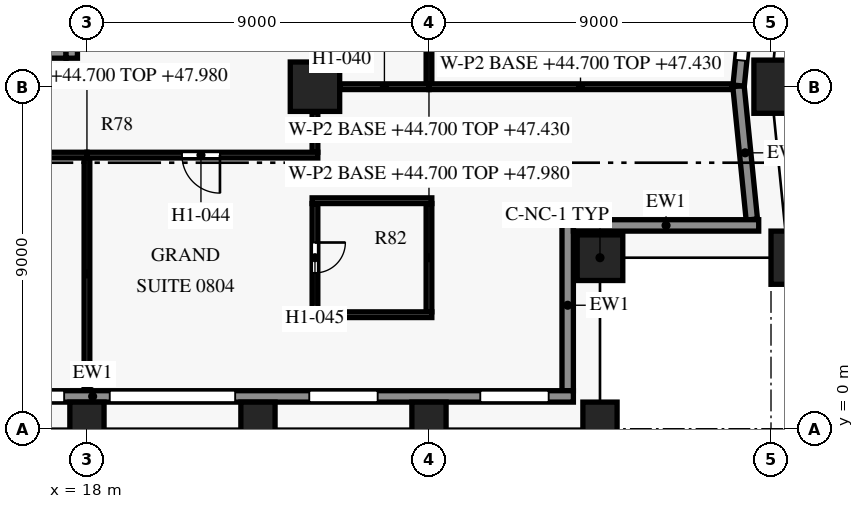
"""IFC4 building model, lengths in metres.
Left out: names, types, materials, properties, quantities, classifications, styles, units other than length and angle.
Written with IfcOpenShell. Run it as: python <this file> out.ifc"""

import sys

from ifc_helpers import new_model, si_unit, direction, frame, frame_2d, origin, origin_2d, place, context, subcontext, project, spatial, rectangle, extrude, element, fill, save


model = new_model("IFC4")
c1 = context("Model", 3, precision=1e-05, world=origin(), true_north=direction((0.0, 1.0)))
c2 = subcontext(c1, "Body", "Model", "MODEL_VIEW")
j1 = project(units=[si_unit("LENGTHUNIT", "METRE"), si_unit("PLANEANGLEUNIT", "RADIAN")], contexts=[c1])
p1 = place(None, origin())
s1 = spatial("IfcSite", under=j1, at=p1, CompositionType="ELEMENT")
p2 = place(p1, origin())
s2 = spatial("IfcBuilding", under=s1, at=p2, CompositionType="ELEMENT")
p3 = place(p2, frame((0.0, 0.0, 44.7)))
s3 = spatial("IfcBuildingStorey", under=s2, at=p3, CompositionType="ELEMENT", Elevation=44.7)
for number, where, z_axis, x_axis in (
    (1, (18.0, 0.0, 0.0), (0.0, 0.0, 1.0), (1.0, 0.0, 0.0)),
    (2, (22.5, 0.0, 0.0), (0.0, 0.0, 1.0), (1.0, 0.0, 0.0)),
    (3, (27.0, 0.0, 0.0), (0.0, 0.0, 1.0), (1.0, 0.0, 0.0)),
    (4, (31.5, 0.0, 0.0), (0.0, 0.0, 1.0), (1.0, 0.0, 0.0)),
    (5, (36.45, 4.5, 0.0), (0.0, 0.0, 1.0), (-0.1, 0.995, 0.0)),
    (6, (36.0, 9.0, 0.0), (0.0, 0.0, 1.0), (0.0, 1.0, 0.0)),
):
    element("IfcColumn", number, at=place(p3, frame(where, z_axis=z_axis, x_axis=x_axis)), inside=s3, PredefinedType="COLUMN", context=c2, shape_type="SweptSolid", body=[
        extrude(rectangle(XDim=0.9, YDim=1.4, at=origin_2d()), origin(), (0.0, 0.0, 1.0), 3.6),
    ])
p4 = place(p3, frame((31.5, 4.5, 0.0), z_axis=(0.0, 0.0, 1.0), x_axis=(1.0, 0.0, 0.0)))
e7 = element("IfcColumn", 7, at=p4, inside=s3, PredefinedType="COLUMN", context=c2, shape_type="SweptSolid", body=[
    extrude(rectangle(XDim=1.2, YDim=1.2, at=origin_2d()), origin(), (0.0, 0.0, 1.0), 3.6),
])
p5 = place(p3, frame((24.0, 9.0, 0.0), z_axis=(0.0, 0.0, 1.0), x_axis=(1.0, 0.0, 0.0)))
e8 = element("IfcColumn", 8, at=p5, inside=s3, PredefinedType="COLUMN", context=c2, shape_type="SweptSolid", body=[
    extrude(rectangle(XDim=1.3, YDim=1.3, at=origin_2d()), origin(), (0.0, 0.0, 1.0), 3.6),
])
p6 = place(p3, frame((30.8, 0.85, 0.0), z_axis=(0.0, 0.0, 1.0), x_axis=(-1.0, 0.0, 0.0)))
e9 = element("IfcWall", 9, at=p6, inside=s3, PredefinedType="SOLIDWALL", context=c2, shape_type="SweptSolid", body=[
    extrude(rectangle(XDim=25.3, YDim=0.3, at=frame_2d((12.65, 0.0))), origin(), (0.0, 0.0, 1.0), 2.95),
])
p7 = place(p6, frame((0.65, 0.0, 0.75)))
e10 = element("IfcOpeningElement", 10, at=p7, cuts=e9, PredefinedType="OPENING", context=c2, shape_type="SweptSolid", body=[
    extrude(rectangle(XDim=1.8, YDim=1.8, at=frame_2d((0.9, 0.9))), frame((0.0, 0.16, 0.0), z_axis=(0.0, -1.0, 0.0), x_axis=(1.0, 0.0, 0.0)), (0.0, 0.0, 1.0), 0.32),
])
p8 = place(p6, frame((5.15, 0.0, 0.75)))
e11 = element("IfcOpeningElement", 11, at=p8, cuts=e9, PredefinedType="OPENING", context=c2, shape_type="SweptSolid", body=[
    extrude(rectangle(XDim=1.8, YDim=1.8, at=frame_2d((0.9, 0.9))), frame((0.0, 0.16, 0.0), z_axis=(0.0, -1.0, 0.0), x_axis=(1.0, 0.0, 0.0)), (0.0, 0.0, 1.0), 0.32),
])
p9 = place(p6, frame((8.9, 0.0, 0.15)))
e12 = element("IfcOpeningElement", 12, at=p9, cuts=e9, PredefinedType="OPENING", context=c2, shape_type="SweptSolid", body=[
    extrude(rectangle(XDim=3.3, YDim=2.4, at=frame_2d((1.65, 1.2))), frame((0.0, 0.16, 0.0), z_axis=(0.0, -1.0, 0.0), x_axis=(1.0, 0.0, 0.0)), (0.0, 0.0, 1.0), 0.32),
])
p10 = place(p6, frame((13.4, 0.0, 0.15)))
e13 = element("IfcOpeningElement", 13, at=p10, cuts=e9, PredefinedType="OPENING", context=c2, shape_type="SweptSolid", body=[
    extrude(rectangle(XDim=3.3, YDim=2.4, at=frame_2d((1.65, 1.2))), frame((0.0, 0.16, 0.0), z_axis=(0.0, -1.0, 0.0), x_axis=(1.0, 0.0, 0.0)), (0.0, 0.0, 1.0), 0.32),
])
p11 = place(p6, frame((18.65, 0.0, 0.75)))
e14 = element("IfcOpeningElement", 14, at=p11, cuts=e9, PredefinedType="OPENING", context=c2, shape_type="SweptSolid", body=[
    extrude(rectangle(XDim=1.8, YDim=1.8, at=frame_2d((0.9, 0.9))), frame((0.0, 0.16, 0.0), z_axis=(0.0, -1.0, 0.0), x_axis=(1.0, 0.0, 0.0)), (0.0, 0.0, 1.0), 0.32),
])
p12 = place(p6, frame((23.15, 0.0, 0.75)))
e15 = element("IfcOpeningElement", 15, at=p12, cuts=e9, PredefinedType="OPENING", context=c2, shape_type="SweptSolid", body=[
    extrude(rectangle(XDim=1.8, YDim=1.8, at=frame_2d((0.9, 0.9))), frame((0.0, 0.16, 0.0), z_axis=(0.0, -1.0, 0.0), x_axis=(1.0, 0.0, 0.0)), (0.0, 0.0, 1.0), 0.32),
])
p13 = place(p3, frame((30.65, 5.5, 0.0), z_axis=(0.0, 0.0, 1.0), x_axis=(0.0, -1.0, 0.0)))
e16 = element("IfcWall", 16, at=p13, inside=s3, PredefinedType="SOLIDWALL", context=c2, shape_type="SweptSolid", body=[
    extrude(rectangle(XDim=4.502, YDim=0.3, at=frame_2d((2.251, 0.0))), origin(), (0.0, 0.0, 1.0), 2.95),
])
p14 = place(p3, frame((35.677, 5.35, 0.0), z_axis=(0.0, 0.0, 1.0), x_axis=(-1.0, 0.0, 0.0)))
e17 = element("IfcWall", 17, at=p14, inside=s3, PredefinedType="SOLIDWALL", context=c2, shape_type="SweptSolid", body=[
    extrude(rectangle(XDim=4.876, YDim=0.3, at=frame_2d((2.438, 0.0))), origin(), (0.0, 0.0, 1.0), 2.95),
])
p15 = place(p3, frame((35.144, 9.015, 0.0), z_axis=(0.0, 0.0, 1.0), x_axis=(0.099462600847, -0.995041301169, 0.0)))
e18 = element("IfcWall", 18, at=p15, inside=s3, PredefinedType="SOLIDWALL", context=c2, shape_type="SweptSolid", body=[
    extrude(rectangle(XDim=3.527, YDim=0.3, at=frame_2d((1.764, 0.0))), origin(), (0.0, 0.0, 1.0), 2.95),
])
p16 = place(p3, frame((36.047, 18.015, 0.0), z_axis=(0.0, 0.0, 1.0), x_axis=(-0.099522457379, -0.995035316196, 0.0)))
e19 = element("IfcWall", 19, at=p16, inside=s3, PredefinedType="SOLIDWALL", context=c2, shape_type="SweptSolid", body=[
    extrude(rectangle(XDim=9.03, YDim=0.3, at=frame_2d((4.515, 0.0))), origin(), (0.0, 0.0, 1.0), 2.95),
])
p17 = place(p16, frame((1.291, 0.0, 0.75)))
e20 = element("IfcOpeningElement", 20, at=p17, cuts=e19, PredefinedType="OPENING", context=c2, shape_type="SweptSolid", body=[
    extrude(rectangle(XDim=1.8, YDim=1.8, at=frame_2d((0.9, 0.9))), frame((0.0, 0.16, 0.0), z_axis=(0.0, -1.0, 0.0), x_axis=(1.0, 0.0, 0.0)), (0.0, 0.0, 1.0), 0.32),
])
p18 = place(p16, frame((5.064, 0.0, 0.15)))
e21 = element("IfcOpeningElement", 21, at=p18, cuts=e19, PredefinedType="OPENING", context=c2, shape_type="SweptSolid", body=[
    extrude(rectangle(XDim=3.3, YDim=2.4, at=frame_2d((1.65, 1.2))), frame((0.0, 0.16, 0.0), z_axis=(0.0, -1.0, 0.0), x_axis=(1.0, 0.0, 0.0)), (0.0, 0.0, 1.0), 0.32),
])
p19 = place(p3, frame((14.15, 9.9, 0.0), z_axis=(0.0, 0.0, 1.0), x_axis=(1.0, 0.0, 0.0)))
e22 = element("IfcWall", 22, at=p19, inside=s3, PredefinedType="SHEAR", context=c2, shape_type="SweptSolid", body=[
    extrude(rectangle(XDim=3.3, YDim=0.3, at=frame_2d((1.65, 0.0))), origin(), (0.0, 0.0, 1.0), 3.3),
])
p20 = place(p3, frame((17.6, 9.75, 0.0), z_axis=(0.0, 0.0, 1.0), x_axis=(0.0, 1.0, 0.0)))
e23 = element("IfcWall", 23, at=p20, inside=s3, PredefinedType="SHEAR", context=c2, shape_type="SweptSolid", body=[
    extrude(rectangle(XDim=8.3, YDim=0.3, at=frame_2d((4.15, 0.0))), origin(), (0.0, 0.0, 1.0), 3.3),
])
p21 = place(p20, frame((0.65, 0.0, 0.0)))
e24 = element("IfcOpeningElement", 24, at=p21, cuts=e23, PredefinedType="OPENING", context=c2, shape_type="SweptSolid", body=[
    extrude(rectangle(XDim=1.2, YDim=2.2, at=frame_2d((0.6, 1.1))), frame((0.0, 0.16, 0.0), z_axis=(0.0, -1.0, 0.0), x_axis=(1.0, 0.0, 0.0)), (0.0, 0.0, 1.0), 0.32),
])
p22 = place(p3, frame((23.925, 3.0, 0.0), z_axis=(0.0, 0.0, 1.0), x_axis=(1.0, 0.0, 0.0)))
e25 = element("IfcWall", 25, at=p22, inside=s3, PredefinedType="PARTITIONING", context=c2, shape_type="SweptSolid", body=[
    extrude(rectangle(XDim=3.15, YDim=0.15, at=frame_2d((1.575, 0.0))), origin(), (0.0, 0.0, 1.0), 2.58),
])
p23 = place(p3, frame((27.0, 3.075, 0.0), z_axis=(0.0, 0.0, 1.0), x_axis=(0.0, 1.0, 0.0)))
e26 = element("IfcWall", 26, at=p23, inside=s3, PredefinedType="PARTITIONING", context=c2, shape_type="SweptSolid", body=[
    extrude(rectangle(XDim=2.85, YDim=0.15, at=frame_2d((1.425, 0.0))), origin(), (0.0, 0.0, 1.0), 3.28),
])
p24 = place(p3, frame((24.0, 5.925, 0.0), z_axis=(0.0, 0.0, 1.0), x_axis=(0.0, -1.0, 0.0)))
e27 = element("IfcWall", 27, at=p24, inside=s3, PredefinedType="PARTITIONING", context=c2, shape_type="SweptSolid", body=[
    extrude(rectangle(XDim=2.85, YDim=0.15, at=frame_2d((1.425, 0.0))), origin(), (0.0, 0.0, 1.0), 2.58),
])
p25 = place(p24, frame((1.025, 0.0, 0.0)))
e28 = element("IfcOpeningElement", 28, at=p25, cuts=e27, PredefinedType="OPENING", context=c2, shape_type="SweptSolid", body=[
    extrude(rectangle(XDim=0.8, YDim=2.1, at=frame_2d((0.4, 1.05))), frame((0.0, 0.085, 0.0), z_axis=(0.0, -1.0, 0.0), x_axis=(1.0, 0.0, 0.0)), (0.0, 0.0, 1.0), 0.17),
])
p26 = place(p3, frame((27.075, 6.0, 0.0), z_axis=(0.0, 0.0, 1.0), x_axis=(-1.0, 0.0, 0.0)))
e29 = element("IfcWall", 29, at=p26, inside=s3, PredefinedType="PARTITIONING", context=c2, shape_type="SweptSolid", body=[
    extrude(rectangle(XDim=3.15, YDim=0.15, at=frame_2d((1.575, 0.0))), origin(), (0.0, 0.0, 1.0), 2.58),
])
p27 = place(p3, frame((18.0, 7.125, 0.0), z_axis=(0.0, 0.0, 1.0), x_axis=(0.0, -1.0, 0.0)))
e30 = element("IfcWall", 30, at=p27, inside=s3, PredefinedType="PARTITIONING", context=c2, shape_type="SweptSolid", body=[
    extrude(rectangle(XDim=6.105, YDim=0.15, at=frame_2d((3.052, 0.0))), origin(), (0.0, 0.0, 1.0), 3.28),
])
p28 = place(p3, frame((18.0, 7.2, 0.0), z_axis=(0.0, 0.0, 1.0), x_axis=(-1.0, 0.0, 0.0)))
e31 = element("IfcWall", 31, at=p28, inside=s3, PredefinedType="PARTITIONING", context=c2, shape_type="SweptSolid", body=[
    extrude(rectangle(XDim=6.075, YDim=0.15, at=frame_2d((3.038, 0.0))), origin(), (0.0, 0.0, 1.0), 2.58),
])
p29 = place(p28, frame((2.5, 0.0, 0.0)))
e32 = element("IfcOpeningElement", 32, at=p29, cuts=e31, PredefinedType="OPENING", context=c2, shape_type="SweptSolid", body=[
    extrude(rectangle(XDim=1.0, YDim=2.1, at=frame_2d((0.5, 1.05))), frame((0.0, 0.085, 0.0), z_axis=(0.0, -1.0, 0.0), x_axis=(1.0, 0.0, 0.0)), (0.0, 0.0, 1.0), 0.17),
])
p30 = place(p3, frame((24.075, 7.2, 0.0), z_axis=(0.0, 0.0, 1.0), x_axis=(-1.0, 0.0, 0.0)))
e33 = element("IfcWall", 33, at=p30, inside=s3, PredefinedType="PARTITIONING", context=c2, shape_type="SweptSolid", body=[
    extrude(rectangle(XDim=6.075, YDim=0.15, at=frame_2d((3.038, 0.0))), origin(), (0.0, 0.0, 1.0), 2.58),
])
p31 = place(p30, frame((2.575, 0.0, 0.0)))
e34 = element("IfcOpeningElement", 34, at=p31, cuts=e33, PredefinedType="OPENING", context=c2, shape_type="SweptSolid", body=[
    extrude(rectangle(XDim=1.0, YDim=2.1, at=frame_2d((0.5, 1.05))), frame((0.0, 0.085, 0.0), z_axis=(0.0, -1.0, 0.0), x_axis=(1.0, 0.0, 0.0)), (0.0, 0.0, 1.0), 0.17),
])
p32 = place(p3, frame((24.0, 8.345, 0.0), z_axis=(0.0, 0.0, 1.0), x_axis=(0.0, -1.0, 0.0)))
e35 = element("IfcWall", 35, at=p32, inside=s3, PredefinedType="PARTITIONING", context=c2, shape_type="SweptSolid", body=[
    extrude(rectangle(XDim=1.07, YDim=0.15, at=frame_2d((0.535, 0.0))), origin(), (0.0, 0.0, 1.0), 2.58),
])
p33 = place(p3, frame((27.0, 9.0, 0.0), z_axis=(0.0, 0.0, 1.0), x_axis=(-1.0, 0.0, 0.0)))
e36 = element("IfcWall", 36, at=p33, inside=s3, PredefinedType="PARTITIONING", context=c2, shape_type="SweptSolid", body=[
    extrude(rectangle(XDim=2.345, YDim=0.15, at=frame_2d((1.172, 0.0))), origin(), (0.0, 0.0, 1.0), 2.73),
])
p34 = place(p3, frame((34.975, 9.0, 0.0), z_axis=(0.0, 0.0, 1.0), x_axis=(-1.0, 0.0, 0.0)))
e37 = element("IfcWall", 37, at=p34, inside=s3, PredefinedType="PARTITIONING", context=c2, shape_type="SweptSolid", body=[
    extrude(rectangle(XDim=7.975, YDim=0.15, at=frame_2d((3.988, 0.0))), origin(), (0.0, 0.0, 1.0), 2.73),
])
p35 = place(p3, frame((27.0, 9.075, 0.0), z_axis=(0.0, 0.0, 1.0), x_axis=(0.0, 1.0, 0.0)))
e38 = element("IfcWall", 38, at=p35, inside=s3, PredefinedType="PARTITIONING", context=c2, shape_type="SweptSolid", body=[
    extrude(rectangle(XDim=1.95, YDim=0.15, at=frame_2d((0.975, 0.0))), origin(), (0.0, 0.0, 1.0), 2.73),
])
p36 = place(p3, frame((24.0, 11.025, 0.0), z_axis=(0.0, 0.0, 1.0), x_axis=(0.0, -1.0, 0.0)))
e39 = element("IfcWall", 39, at=p36, inside=s3, PredefinedType="PARTITIONING", context=c2, shape_type="SweptSolid", body=[
    extrude(rectangle(XDim=1.37, YDim=0.15, at=frame_2d((0.685, 0.0))), origin(), (0.0, 0.0, 1.0), 2.58),
])
p37 = place(p7, origin())
e40 = element("IfcWindow", 40, at=p37, inside=s3, PartitioningType="SINGLE_PANEL", PredefinedType="WINDOW", context=c2, shape_type="SweptSolid", body=[
    extrude(rectangle(XDim=1.8, YDim=1.8, at=frame_2d((0.9, 0.9))), frame((0.0, 0.03, 0.0), z_axis=(0.0, -1.0, 0.0), x_axis=(1.0, 0.0, 0.0)), (0.0, 0.0, 1.0), 0.06),
])
fill(e10, e40)
p38 = place(p8, origin())
e41 = element("IfcWindow", 41, at=p38, inside=s3, PartitioningType="SINGLE_PANEL", PredefinedType="WINDOW", context=c2, shape_type="SweptSolid", body=[
    extrude(rectangle(XDim=1.8, YDim=1.8, at=frame_2d((0.9, 0.9))), frame((0.0, 0.03, 0.0), z_axis=(0.0, -1.0, 0.0), x_axis=(1.0, 0.0, 0.0)), (0.0, 0.0, 1.0), 0.06),
])
fill(e11, e41)
p39 = place(p9, origin())
e42 = element("IfcWindow", 42, at=p39, inside=s3, PartitioningType="SINGLE_PANEL", PredefinedType="WINDOW", context=c2, shape_type="SweptSolid", body=[
    extrude(rectangle(XDim=3.3, YDim=2.4, at=frame_2d((1.65, 1.2))), frame((0.0, 0.03, 0.0), z_axis=(0.0, -1.0, 0.0), x_axis=(1.0, 0.0, 0.0)), (0.0, 0.0, 1.0), 0.06),
])
fill(e12, e42)
p40 = place(p10, origin())
e43 = element("IfcWindow", 43, at=p40, inside=s3, PartitioningType="SINGLE_PANEL", PredefinedType="WINDOW", context=c2, shape_type="SweptSolid", body=[
    extrude(rectangle(XDim=3.3, YDim=2.4, at=frame_2d((1.65, 1.2))), frame((0.0, 0.03, 0.0), z_axis=(0.0, -1.0, 0.0), x_axis=(1.0, 0.0, 0.0)), (0.0, 0.0, 1.0), 0.06),
])
fill(e13, e43)
p41 = place(p18, origin())
e44 = element("IfcWindow", 44, at=p41, inside=s3, PartitioningType="SINGLE_PANEL", PredefinedType="WINDOW", context=c2, shape_type="SweptSolid", body=[
    extrude(rectangle(XDim=3.3, YDim=2.4, at=frame_2d((1.65, 1.2))), frame((0.0, 0.03, 0.0), z_axis=(0.0, -1.0, 0.0), x_axis=(1.0, 0.0, 0.0)), (0.0, 0.0, 1.0), 0.06),
])
fill(e21, e44)
p42 = place(p31, origin())
e45 = element("IfcDoor", 45, at=p42, inside=s3, OperationType="SINGLE_SWING_LEFT", PredefinedType="DOOR", context=c2, shape_type="SweptSolid", body=[
    extrude(rectangle(XDim=1.0, YDim=2.1, at=frame_2d((0.5, 1.05))), frame((0.0, 0.025, 0.0), z_axis=(0.0, -1.0, 0.0), x_axis=(1.0, 0.0, 0.0)), (0.0, 0.0, 1.0), 0.05),
])
fill(e34, e45)
p43 = place(p25, origin())
e46 = element("IfcDoor", 46, at=p43, inside=s3, OperationType="SINGLE_SWING_RIGHT", PredefinedType="DOOR", context=c2, shape_type="SweptSolid", body=[
    extrude(rectangle(XDim=0.8, YDim=2.1, at=frame_2d((0.4, 1.05))), frame((0.0, 0.025, 0.0), z_axis=(0.0, -1.0, 0.0), x_axis=(1.0, 0.0, 0.0)), (0.0, 0.0, 1.0), 0.05),
])
fill(e28, e46)
save(model, sys.argv[1])
